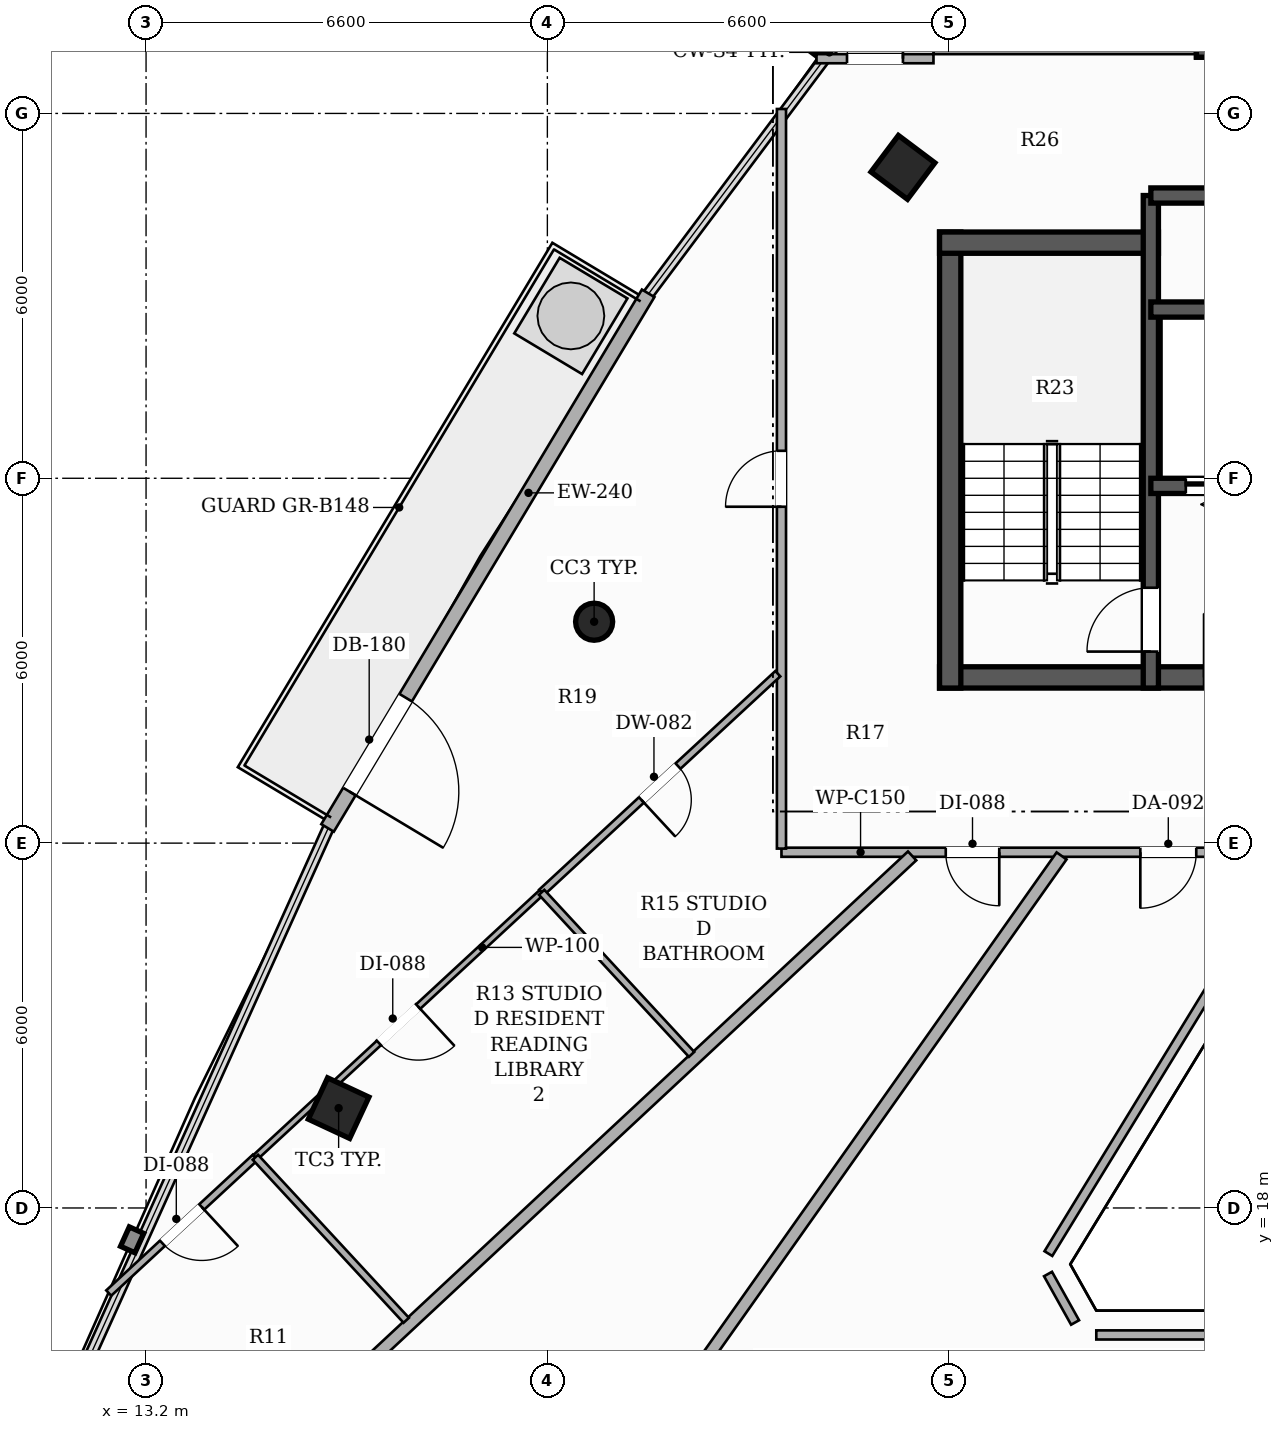
"""IFC4 building model, lengths in metres.
Left out: names, types, materials, properties, quantities, classifications, styles, units other than length and angle.
Written with IfcOpenShell. Run it as: python <this file> out.ifc"""

import sys

from ifc_helpers import new_model, si_unit, direction, frame, frame_2d, origin, origin_2d, place, context, subcontext, project, spatial, rectangle, hollow_rectangle, hollow_circle, extrude, element, fill, save


model = new_model("IFC4")
c1 = context("Model", 3, precision=1e-05, world=origin(), true_north=direction((0.0, 1.0)))
c2 = subcontext(c1, "Body", "Model", "MODEL_VIEW")
j1 = project(units=[si_unit("LENGTHUNIT", "METRE"), si_unit("PLANEANGLEUNIT", "RADIAN")], contexts=[c1])
p1 = place(None, origin())
s1 = spatial("IfcSite", under=j1, at=p1, CompositionType="ELEMENT")
p2 = place(p1, origin())
s2 = spatial("IfcBuilding", under=s1, at=p2, CompositionType="ELEMENT")
p3 = place(p2, frame((0.0, 0.0, 222.8)))
s3 = spatial("IfcBuildingStorey", under=s2, at=p3, CompositionType="ELEMENT", Elevation=222.8)
p4 = place(p3, frame((26.25, 26.725, 0.0), z_axis=(0.0, 0.0, 1.0), x_axis=(1.0, 0.0, 0.0)))
e1 = element("IfcWall", 1, at=p4, inside=s3, PredefinedType="SHEAR", context=c2, shape_type="SweptSolid", body=[
    extrude(rectangle(XDim=13.5, YDim=0.35, at=frame_2d((6.75, 0.0))), origin(), (0.0, 0.0, 1.0), 3.3),
])
p5 = place(p4, frame((4.35, 0.0, 0.0)))
e2 = element("IfcOpeningElement", 2, at=p5, cuts=e1, PredefinedType="OPENING", context=c2, shape_type="SweptSolid", body=[
    extrude(rectangle(XDim=1.05, YDim=2.15, at=frame_2d((0.525, 1.075))), frame((0.0, 0.185, 0.0), z_axis=(0.0, -1.0, 0.0), x_axis=(1.0, 0.0, 0.0)), (0.0, 0.0, 1.0), 0.37),
])
p6 = place(p4, frame((8.3, 0.0, 0.0)))
e3 = element("IfcOpeningElement", 3, at=p6, cuts=e1, PredefinedType="OPENING", context=c2, shape_type="SweptSolid", body=[
    extrude(rectangle(XDim=1.05, YDim=2.15, at=frame_2d((0.525, 1.075))), frame((0.0, 0.185, 0.0), z_axis=(0.0, -1.0, 0.0), x_axis=(1.0, 0.0, 0.0)), (0.0, 0.0, 1.0), 0.37),
])
p7 = place(p3, frame((26.425, 26.55, 0.0), z_axis=(0.0, 0.0, 1.0), x_axis=(0.0, 1.0, 0.0)))
e4 = element("IfcWall", 4, at=p7, inside=s3, PredefinedType="SHEAR", context=c2, shape_type="SweptSolid", body=[
    extrude(rectangle(XDim=7.5, YDim=0.35, at=frame_2d((3.75, 0.0))), origin(), (0.0, 0.0, 1.0), 3.3),
])
p8 = place(p3, frame((26.25, 33.875, 0.0), z_axis=(0.0, 0.0, 1.0), x_axis=(1.0, 0.0, 0.0)))
e5 = element("IfcWall", 5, at=p8, inside=s3, PredefinedType="SHEAR", context=c2, shape_type="SweptSolid", body=[
    extrude(rectangle(XDim=3.6, YDim=0.35, at=frame_2d((1.8, 0.0))), origin(), (0.0, 0.0, 1.0), 3.3),
])
p9 = place(p3, frame((29.725, 26.55, 0.0), z_axis=(0.0, 0.0, 1.0), x_axis=(0.0, 1.0, 0.0)))
e6 = element("IfcWall", 6, at=p9, inside=s3, PredefinedType="SHEAR", context=c2, shape_type="SweptSolid", body=[
    extrude(rectangle(XDim=8.1, YDim=0.25, at=frame_2d((4.05, 0.0))), origin(), (0.0, 0.0, 1.0), 3.3),
])
p10 = place(p9, frame((0.6, 0.0, 0.0)))
e7 = element("IfcOpeningElement", 7, at=p10, cuts=e6, PredefinedType="OPENING", context=c2, shape_type="SweptSolid", body=[
    extrude(rectangle(XDim=1.05, YDim=2.15, at=frame_2d((0.525, 1.075))), frame((0.0, 0.135, 0.0), z_axis=(0.0, -1.0, 0.0), x_axis=(1.0, 0.0, 0.0)), (0.0, 0.0, 1.0), 0.27),
])
p11 = place(p3, frame((36.275, 29.875, 0.0), z_axis=(0.0, 0.0, 1.0), x_axis=(-1.0, 0.0, 0.0)))
e8 = element("IfcWall", 8, at=p11, inside=s3, PredefinedType="SHEAR", context=c2, shape_type="SweptSolid", body=[
    extrude(rectangle(XDim=6.55, YDim=0.25, at=frame_2d((3.275, 0.0))), origin(), (0.0, 0.0, 1.0), 3.3),
])
p12 = place(p11, frame((4.875, 0.0, 0.0)))
e9 = element("IfcOpeningElement", 9, at=p12, cuts=e8, PredefinedType="OPENING", context=c2, shape_type="SweptSolid", body=[
    extrude(rectangle(XDim=1.1, YDim=2.2, at=frame_2d((0.55, 1.1))), frame((0.0, 0.135, 0.0), z_axis=(0.0, -1.0, 0.0), x_axis=(1.0, 0.0, 0.0)), (0.0, 0.0, 1.0), 0.27),
])
p13 = place(p11, frame((2.875, 0.0, 0.0)))
e10 = element("IfcOpeningElement", 10, at=p13, cuts=e8, PredefinedType="OPENING", context=c2, shape_type="SweptSolid", body=[
    extrude(rectangle(XDim=1.1, YDim=2.2, at=frame_2d((0.55, 1.1))), frame((0.0, 0.135, 0.0), z_axis=(0.0, -1.0, 0.0), x_axis=(1.0, 0.0, 0.0)), (0.0, 0.0, 1.0), 0.27),
])
p14 = place(p11, frame((0.6, 0.0, 0.0)))
e11 = element("IfcOpeningElement", 11, at=p14, cuts=e8, PredefinedType="OPENING", context=c2, shape_type="SweptSolid", body=[
    extrude(rectangle(XDim=1.3, YDim=2.2, at=frame_2d((0.65, 1.1))), frame((0.0, 0.135, 0.0), z_axis=(0.0, -1.0, 0.0), x_axis=(1.0, 0.0, 0.0)), (0.0, 0.0, 1.0), 0.27),
])
p15 = place(p3, frame((29.725, 32.775, 0.0), z_axis=(0.0, 0.0, 1.0), x_axis=(1.0, 0.0, 0.0)))
e12 = element("IfcWall", 12, at=p15, inside=s3, PredefinedType="SHEAR", context=c2, shape_type="SweptSolid", body=[
    extrude(rectangle(XDim=6.55, YDim=0.25, at=frame_2d((3.275, 0.0))), origin(), (0.0, 0.0, 1.0), 3.3),
])
p16 = place(p3, frame((29.725, 34.65, 0.0), z_axis=(0.0, 0.0, 1.0), x_axis=(1.0, 0.0, 0.0)))
e13 = element("IfcWall", 13, at=p16, inside=s3, PredefinedType="SHEAR", context=c2, shape_type="SweptSolid", body=[
    extrude(rectangle(XDim=6.55, YDim=0.25, at=frame_2d((3.275, 0.0))), origin(), (0.0, 0.0, 1.0), 3.3),
])
p17 = place(p16, frame((2.84, 0.0, 0.0)))
e14 = element("IfcOpeningElement", 14, at=p17, cuts=e13, PredefinedType="OPENING", context=c2, shape_type="SweptSolid", body=[
    extrude(rectangle(XDim=0.82, YDim=2.1, at=frame_2d((0.41, 1.05))), frame((0.0, 0.135, 0.0), z_axis=(0.0, -1.0, 0.0), x_axis=(1.0, 0.0, 0.0)), (0.0, 0.0, 1.0), 0.27),
])
p18 = place(p3, frame((35.525, 37.05, 0.0), z_axis=(0.0, 0.0, 1.0), x_axis=(-1.0, 0.0, 0.0)))
e15 = element("IfcWall", 15, at=p18, inside=s3, PredefinedType="SHEAR", context=c2, shape_type="SweptSolid", body=[
    extrude(rectangle(XDim=5.05, YDim=0.25, at=frame_2d((2.525, 0.0))), origin(), (0.0, 0.0, 1.0), 3.3),
])
p19 = place(p18, frame((3.175, 0.0, 0.0)))
e16 = element("IfcOpeningElement", 16, at=p19, cuts=e15, PredefinedType="OPENING", context=c2, shape_type="SweptSolid", body=[
    extrude(rectangle(XDim=1.1, YDim=2.2, at=frame_2d((0.55, 1.1))), frame((0.0, 0.135, 0.0), z_axis=(0.0, -1.0, 0.0), x_axis=(1.0, 0.0, 0.0)), (0.0, 0.0, 1.0), 0.27),
])
p20 = place(p18, frame((0.775, 0.0, 0.0)))
e17 = element("IfcOpeningElement", 17, at=p20, cuts=e15, PredefinedType="OPENING", context=c2, shape_type="SweptSolid", body=[
    extrude(rectangle(XDim=1.1, YDim=2.2, at=frame_2d((0.55, 1.1))), frame((0.0, 0.135, 0.0), z_axis=(0.0, -1.0, 0.0), x_axis=(1.0, 0.0, 0.0)), (0.0, 0.0, 1.0), 0.27),
])
p21 = place(p3, frame((30.6, 36.925, 0.0), z_axis=(0.0, 0.0, 1.0), x_axis=(0.0, 1.0, 0.0)))
e18 = element("IfcWall", 18, at=p21, inside=s3, PredefinedType="SHEAR", context=c2, shape_type="SweptSolid", body=[
    extrude(rectangle(XDim=2.8, YDim=0.25, at=frame_2d((1.4, 0.0))), origin(), (0.0, 0.0, 1.0), 3.3),
])
p22 = place(p3, frame((25.648, 35.113, 0.0), z_axis=(0.0, 0.0, 1.0), x_axis=(0.600420225326, 0.799684658487, 0.0)))
e19 = element("IfcColumn", 19, at=p22, inside=s3, PredefinedType="COLUMN", context=c2, shape_type="SweptSolid", body=[
    extrude(hollow_rectangle(XDim=0.75, YDim=0.75, WallThickness=0.025, at=origin_2d()), origin(), (0.0, 0.0, 1.0), 3.3),
])
p23 = place(p3, frame((20.569, 27.641, 0.0), z_axis=(0.0, 0.0, 1.0), x_axis=(1.0, 0.0, 0.0)))
e20 = element("IfcColumn", 20, at=p23, inside=s3, PredefinedType="COLUMN", context=c2, shape_type="SweptSolid", body=[
    extrude(hollow_circle(Radius=0.305, WallThickness=0.016, at=origin_2d()), origin(), (0.0, 0.0, 1.0), 3.3),
])
p24 = place(p3, frame((16.367, 19.642, 0.0), z_axis=(0.0, 0.0, 1.0), x_axis=(0.422618261741, 0.906307787037, 0.0)))
e21 = element("IfcColumn", 21, at=p24, inside=s3, PredefinedType="COLUMN", context=c2, shape_type="SweptSolid", body=[
    extrude(hollow_rectangle(XDim=0.75, YDim=0.75, WallThickness=0.025, at=origin_2d()), origin(), (0.0, 0.0, 1.0), 3.3),
])
p25 = place(p3, frame((21.458, 33.042, 0.0), z_axis=(0.0, 0.0, 1.0), x_axis=(-0.51433465168, -0.857589567381, 0.0)))
e22 = element("IfcWall", 22, at=p25, inside=s3, PredefinedType="SOLIDWALL", context=c2, shape_type="SweptSolid", body=[
    extrude(rectangle(XDim=10.252, YDim=0.24, at=frame_2d((5.126, 0.0))), origin(), (0.0, 0.0, 1.0), 2.624),
])
p26 = place(p25, frame((7.754, 0.0, 0.0)))
e23 = element("IfcOpeningElement", 23, at=p26, cuts=e22, PredefinedType="OPENING", context=c2, shape_type="SweptSolid", body=[
    extrude(rectangle(XDim=1.8, YDim=2.2, at=frame_2d((0.9, 1.1))), frame((0.0, 0.13, 0.0), z_axis=(0.0, -1.0, 0.0), x_axis=(1.0, 0.0, 0.0)), (0.0, 0.0, 1.0), 0.26),
])
p27 = place(p3, frame((32.073, 23.85, 0.0), z_axis=(0.0, 0.0, 1.0), x_axis=(-1.0, 0.0, 0.0)))
e24 = element("IfcWall", 24, at=p27, inside=s3, PredefinedType="PARTITIONING", context=c2, shape_type="SweptSolid", body=[
    extrude(rectangle(XDim=8.423, YDim=0.15, at=frame_2d((4.211, 0.0))), origin(), (0.0, 0.0, 1.0), 2.565),
])
p28 = place(p27, frame((1.601, 0.0, 0.0)))
e25 = element("IfcOpeningElement", 25, at=p28, cuts=e24, PredefinedType="OPENING", context=c2, shape_type="SweptSolid", body=[
    extrude(rectangle(XDim=0.92, YDim=2.15, at=frame_2d((0.46, 1.075))), frame((0.0, 0.085, 0.0), z_axis=(0.0, -1.0, 0.0), x_axis=(1.0, 0.0, 0.0)), (0.0, 0.0, 1.0), 0.17),
])
p29 = place(p27, frame((4.841, 0.0, 0.0)))
e26 = element("IfcOpeningElement", 26, at=p29, cuts=e24, PredefinedType="OPENING", context=c2, shape_type="SweptSolid", body=[
    extrude(rectangle(XDim=0.88, YDim=2.1, at=frame_2d((0.44, 1.05))), frame((0.0, 0.085, 0.0), z_axis=(0.0, -1.0, 0.0), x_axis=(1.0, 0.0, 0.0)), (0.0, 0.0, 1.0), 0.17),
])
p30 = place(p3, frame((23.65, 23.91, 0.0), z_axis=(0.0, 0.0, 1.0), x_axis=(0.0, 1.0, 0.0)))
e27 = element("IfcWall", 27, at=p30, inside=s3, PredefinedType="PARTITIONING", context=c2, shape_type="SweptSolid", body=[
    extrude(rectangle(XDim=12.163, YDim=0.15, at=frame_2d((6.082, 0.0))), origin(), (0.0, 0.0, 1.0), 2.492),
])
p31 = place(p30, frame((5.622, 0.0, 0.0)))
e28 = element("IfcOpeningElement", 28, at=p31, cuts=e27, PredefinedType="OPENING", context=c2, shape_type="SweptSolid", body=[
    extrude(rectangle(XDim=0.92, YDim=2.15, at=frame_2d((0.46, 1.075))), frame((0.0, 0.085, 0.0), z_axis=(0.0, -1.0, 0.0), x_axis=(1.0, 0.0, 0.0)), (0.0, 0.0, 1.0), 0.17),
])
p32 = place(p3, frame((24.226, 36.9, 0.0), z_axis=(0.0, 0.0, 1.0), x_axis=(1.0, 0.0, 0.0)))
e29 = element("IfcWall", 29, at=p32, inside=s3, PredefinedType="PARTITIONING", context=c2, shape_type="SweptSolid", body=[
    extrude(rectangle(XDim=1.924, YDim=0.15, at=frame_2d((0.962, 0.0))), origin(), (0.0, 0.0, 1.0), 2.619),
])
p33 = place(p32, frame((0.502, 0.0, 0.0)))
e30 = element("IfcOpeningElement", 30, at=p33, cuts=e29, PredefinedType="OPENING", context=c2, shape_type="SweptSolid", body=[
    extrude(rectangle(XDim=0.92, YDim=2.15, at=frame_2d((0.46, 1.075))), frame((0.0, 0.085, 0.0), z_axis=(0.0, -1.0, 0.0), x_axis=(1.0, 0.0, 0.0)), (0.0, 0.0, 1.0), 0.17),
])
p34 = place(p3, frame((26.15, 37.05, 0.0), z_axis=(0.0, 0.0, 1.0), x_axis=(1.0, 0.0, 0.0)))
e31 = element("IfcWall", 31, at=p34, inside=s3, PredefinedType="PARTITIONING", context=c2, shape_type="SweptSolid", body=[
    extrude(rectangle(XDim=4.3, YDim=0.15, at=frame_2d((2.15, 0.0))), origin(), (0.0, 0.0, 1.0), 2.425),
])
p35 = place(p3, frame((37.172, 15.912, 0.0), z_axis=(0.0, 0.0, 1.0), x_axis=(-1.0, 0.0, 0.0)))
e32 = element("IfcWall", 32, at=p35, inside=s3, PredefinedType="PARTITIONING", context=c2, shape_type="SweptSolid", body=[
    extrude(rectangle(XDim=8.344, YDim=0.15, at=frame_2d((4.172, 0.0))), origin(), (0.0, 0.0, 1.0), 2.773),
])
p36 = place(p3, frame((28.479, 16.117, 0.0), z_axis=(0.0, 0.0, 1.0), x_axis=(-0.487503666908, 0.873120939361, 0.0)))
e33 = element("IfcWall", 33, at=p36, inside=s3, PredefinedType="PARTITIONING", context=c2, shape_type="SweptSolid", body=[
    extrude(rectangle(XDim=0.913, YDim=0.15, at=frame_2d((0.457, 0.0))), origin(), (0.0, 0.0, 1.0), 3.06),
])
p37 = place(p3, frame((28.04, 17.25, 0.0), z_axis=(0.0, 0.0, 1.0), x_axis=(0.521949656317, 0.852976292912, 0.0)))
e34 = element("IfcWall", 34, at=p37, inside=s3, PredefinedType="PARTITIONING", context=c2, shape_type="SweptSolid", body=[
    extrude(rectangle(XDim=7.667, YDim=0.15, at=frame_2d((3.833, 0.0))), origin(), (0.0, 0.0, 1.0), 2.773),
])
p38 = place(p3, frame((15.776, 6.132, 0.0), z_axis=(0.0, 0.0, 1.0), x_axis=(0.577200381612, 0.816602546816, 0.0)))
e35 = element("IfcWall", 35, at=p38, inside=s3, PredefinedType="PARTITIONING", context=c2, shape_type="SweptSolid", body=[
    extrude(rectangle(XDim=21.624, YDim=0.2, at=frame_2d((10.812, 0.0))), origin(), (0.0, 0.0, 1.0), 2.492),
])
p39 = place(p3, frame((25.799, 23.79, 0.0), z_axis=(0.0, 0.0, 1.0), x_axis=(-0.731584830333, -0.681750420629, 0.0)))
e36 = element("IfcWall", 36, at=p39, inside=s3, PredefinedType="PARTITIONING", context=c2, shape_type="SweptSolid", body=[
    extrude(rectangle(XDim=21.776, YDim=0.2, at=frame_2d((10.888, 0.0))), origin(), (0.0, 0.0, 1.0), 2.492),
])
p40 = place(p3, frame((23.59, 26.786, 0.0), z_axis=(0.0, 0.0, 1.0), x_axis=(-0.733888422473, -0.679270037143, 0.0)))
e37 = element("IfcWall", 37, at=p40, inside=s3, PredefinedType="PARTITIONING", context=c2, shape_type="SweptSolid", body=[
    extrude(rectangle(XDim=5.292, YDim=0.12, at=frame_2d((2.646, 0.0))), origin(), (0.0, 0.0, 1.0), 3.06),
])
p41 = place(p40, frame((2.236, 0.0, 0.0)))
e38 = element("IfcOpeningElement", 38, at=p41, cuts=e37, PredefinedType="OPENING", context=c2, shape_type="SweptSolid", body=[
    extrude(rectangle(XDim=0.82, YDim=2.1, at=frame_2d((0.41, 1.05))), frame((0.0, 0.07, 0.0), z_axis=(0.0, -1.0, 0.0), x_axis=(1.0, 0.0, 0.0)), (0.0, 0.0, 1.0), 0.14),
])
p42 = place(p3, frame((14.998, 18.834, 0.0), z_axis=(0.0, 0.0, 1.0), x_axis=(-0.733840210512, -0.679322121998, 0.0)))
e39 = element("IfcWall", 39, at=p42, inside=s3, PredefinedType="PARTITIONING", context=c2, shape_type="SweptSolid", body=[
    extrude(rectangle(XDim=3.287, YDim=0.12, at=frame_2d((1.644, 0.0))), origin(), (0.0, 0.0, 1.0), 3.06),
])
p43 = place(p42, frame((1.203, 0.0, 0.0)))
e40 = element("IfcOpeningElement", 40, at=p43, cuts=e39, PredefinedType="OPENING", context=c2, shape_type="SweptSolid", body=[
    extrude(rectangle(XDim=0.88, YDim=2.1, at=frame_2d((0.44, 1.05))), frame((0.0, 0.07, 0.0), z_axis=(0.0, -1.0, 0.0), x_axis=(1.0, 0.0, 0.0)), (0.0, 0.0, 1.0), 0.14),
])
p44 = place(p3, frame((19.706, 23.191, 0.0), z_axis=(0.0, 0.0, 1.0), x_axis=(-0.733941951163, -0.679212199775, 0.0)))
e41 = element("IfcWall", 41, at=p44, inside=s3, PredefinedType="PARTITIONING", context=c2, shape_type="SweptSolid", body=[
    extrude(rectangle(XDim=6.415, YDim=0.1, at=frame_2d((3.208, 0.0))), origin(), (0.0, 0.0, 1.0), 2.492),
])
p45 = place(p44, frame((2.767, 0.0, 0.0)))
e42 = element("IfcOpeningElement", 42, at=p45, cuts=e41, PredefinedType="OPENING", context=c2, shape_type="SweptSolid", body=[
    extrude(rectangle(XDim=0.88, YDim=2.1, at=frame_2d((0.44, 1.05))), frame((0.0, 0.06, 0.0), z_axis=(0.0, -1.0, 0.0), x_axis=(1.0, 0.0, 0.0)), (0.0, 0.0, 1.0), 0.12),
])
p46 = place(p3, frame((22.172, 20.526, 0.0), z_axis=(0.0, 0.0, 1.0), x_axis=(-0.67917603964, 0.733975413198, 0.0)))
e43 = element("IfcWall", 43, at=p46, inside=s3, PredefinedType="PARTITIONING", context=c2, shape_type="SweptSolid", body=[
    extrude(rectangle(XDim=3.631, YDim=0.12, at=frame_2d((1.815, 0.0))), origin(), (0.0, 0.0, 1.0), 2.565),
])
p47 = place(p3, frame((14.998, 18.834, 0.0), z_axis=(0.0, 0.0, 1.0), x_axis=(0.67920675179, -0.733946992856, 0.0)))
e44 = element("IfcWall", 44, at=p47, inside=s3, PredefinedType="PARTITIONING", context=c2, shape_type="SweptSolid", body=[
    extrude(rectangle(XDim=3.653, YDim=0.12, at=frame_2d((1.826, 0.0))), origin(), (0.0, 0.0, 1.0), 2.492),
])
p48 = place(p26, origin())
e45 = element("IfcDoor", 45, at=p48, inside=s3, OperationType="SINGLE_SWING_RIGHT", PredefinedType="DOOR", context=c2, shape_type="SweptSolid", body=[
    extrude(rectangle(XDim=1.8, YDim=2.2, at=frame_2d((0.9, 1.1))), frame((0.0, 0.025, 0.0), z_axis=(0.0, -1.0, 0.0), x_axis=(1.0, 0.0, 0.0)), (0.0, 0.0, 1.0), 0.05),
])
fill(e23, e45)
p49 = place(p10, origin())
e46 = element("IfcDoor", 46, at=p49, inside=s3, OperationType="SINGLE_SWING_LEFT", PredefinedType="DOOR", context=c2, shape_type="SweptSolid", body=[
    extrude(rectangle(XDim=1.05, YDim=2.15, at=frame_2d((0.525, 1.075))), frame((0.0, 0.025, 0.0), z_axis=(0.0, -1.0, 0.0), x_axis=(1.0, 0.0, 0.0)), (0.0, 0.0, 1.0), 0.05),
])
fill(e7, e46)
p50 = place(p5, origin())
e47 = element("IfcDoor", 47, at=p50, inside=s3, OperationType="SINGLE_SWING_LEFT", PredefinedType="DOOR", context=c2, shape_type="SweptSolid", body=[
    extrude(rectangle(XDim=1.05, YDim=2.15, at=frame_2d((0.525, 1.075))), frame((0.0, 0.025, 0.0), z_axis=(0.0, -1.0, 0.0), x_axis=(1.0, 0.0, 0.0)), (0.0, 0.0, 1.0), 0.05),
])
fill(e2, e47)
p51 = place(p12, origin())
e48 = element("IfcDoor", 48, at=p51, inside=s3, OperationType="DOUBLE_DOOR_SLIDING", PredefinedType="DOOR", context=c2, shape_type="SweptSolid", body=[
    extrude(rectangle(XDim=1.1, YDim=2.2, at=frame_2d((0.55, 1.1))), frame((0.0, 0.025, 0.0), z_axis=(0.0, -1.0, 0.0), x_axis=(1.0, 0.0, 0.0)), (0.0, 0.0, 1.0), 0.05),
])
fill(e9, e48)
p52 = place(p28, origin())
e49 = element("IfcDoor", 49, at=p52, inside=s3, OperationType="SINGLE_SWING_RIGHT", PredefinedType="DOOR", context=c2, shape_type="SweptSolid", body=[
    extrude(rectangle(XDim=0.92, YDim=2.15, at=frame_2d((0.46, 1.075))), frame((0.0, 0.025, 0.0), z_axis=(0.0, -1.0, 0.0), x_axis=(1.0, 0.0, 0.0)), (0.0, 0.0, 1.0), 0.05),
])
fill(e25, e49)
p53 = place(p31, origin())
e50 = element("IfcDoor", 50, at=p53, inside=s3, OperationType="SINGLE_SWING_LEFT", PredefinedType="DOOR", context=c2, shape_type="SweptSolid", body=[
    extrude(rectangle(XDim=0.92, YDim=2.15, at=frame_2d((0.46, 1.075))), frame((0.0, 0.025, 0.0), z_axis=(0.0, -1.0, 0.0), x_axis=(1.0, 0.0, 0.0)), (0.0, 0.0, 1.0), 0.05),
])
fill(e28, e50)
p54 = place(p41, origin())
e51 = element("IfcDoor", 51, at=p54, inside=s3, OperationType="SINGLE_SWING_RIGHT", PredefinedType="DOOR", context=c2, shape_type="SweptSolid", body=[
    extrude(rectangle(XDim=0.82, YDim=2.1, at=frame_2d((0.41, 1.05))), frame((0.0, 0.025, 0.0), z_axis=(0.0, -1.0, 0.0), x_axis=(1.0, 0.0, 0.0)), (0.0, 0.0, 1.0), 0.05),
])
fill(e38, e51)
p55 = place(p43, origin())
e52 = element("IfcDoor", 52, at=p55, inside=s3, OperationType="SINGLE_SWING_LEFT", PredefinedType="DOOR", context=c2, shape_type="SweptSolid", body=[
    extrude(rectangle(XDim=0.88, YDim=2.1, at=frame_2d((0.44, 1.05))), frame((0.0, 0.025, 0.0), z_axis=(0.0, -1.0, 0.0), x_axis=(1.0, 0.0, 0.0)), (0.0, 0.0, 1.0), 0.05),
])
fill(e40, e52)
p56 = place(p45, origin())
e53 = element("IfcDoor", 53, at=p56, inside=s3, OperationType="SINGLE_SWING_LEFT", PredefinedType="DOOR", context=c2, shape_type="SweptSolid", body=[
    extrude(rectangle(XDim=0.88, YDim=2.1, at=frame_2d((0.44, 1.05))), frame((0.0, 0.025, 0.0), z_axis=(0.0, -1.0, 0.0), x_axis=(1.0, 0.0, 0.0)), (0.0, 0.0, 1.0), 0.05),
])
fill(e42, e53)
p57 = place(p33, origin())
e54 = element("IfcDoor", 54, at=p57, inside=s3, OperationType="SINGLE_SWING_RIGHT", PredefinedType="DOOR", context=c2, shape_type="SweptSolid", body=[
    extrude(rectangle(XDim=0.92, YDim=2.15, at=frame_2d((0.46, 1.075))), frame((0.0, 0.025, 0.0), z_axis=(0.0, -1.0, 0.0), x_axis=(1.0, 0.0, 0.0)), (0.0, 0.0, 1.0), 0.05),
])
fill(e30, e54)
p58 = place(p29, origin())
e55 = element("IfcDoor", 55, at=p58, inside=s3, OperationType="SINGLE_SWING_LEFT", PredefinedType="DOOR", context=c2, shape_type="SweptSolid", body=[
    extrude(rectangle(XDim=0.88, YDim=2.1, at=frame_2d((0.44, 1.05))), frame((0.0, 0.025, 0.0), z_axis=(0.0, -1.0, 0.0), x_axis=(1.0, 0.0, 0.0)), (0.0, 0.0, 1.0), 0.05),
])
fill(e26, e55)
save(model, sys.argv[1])
